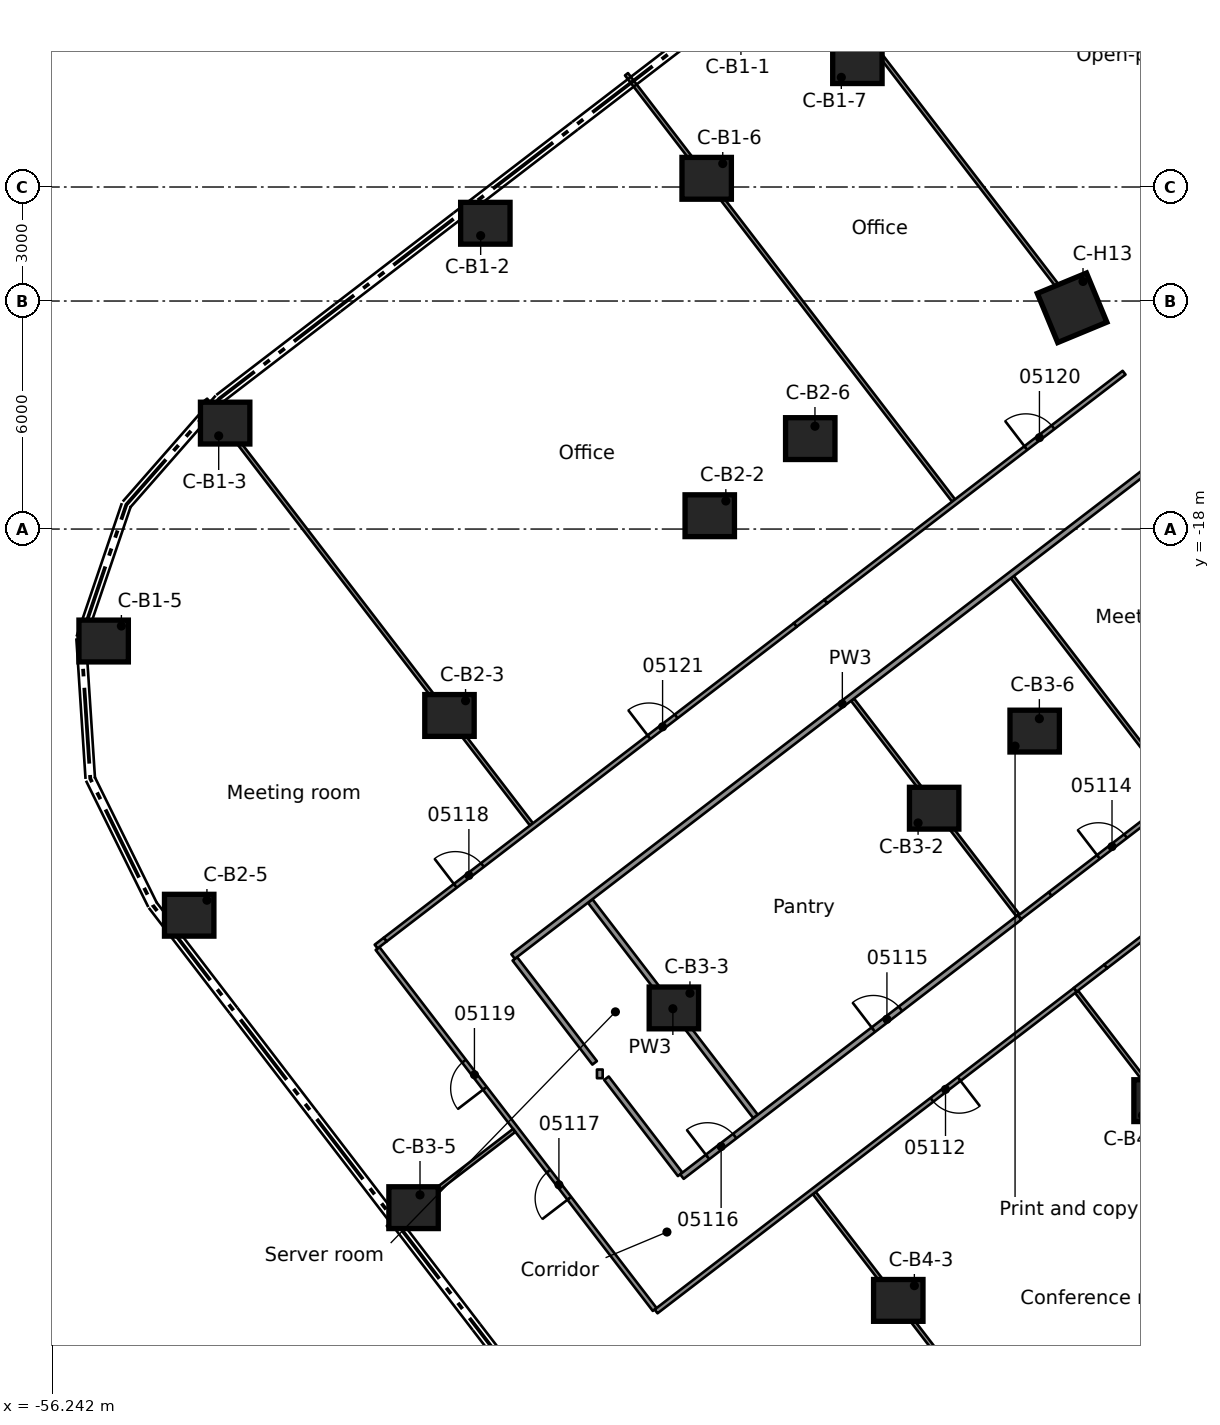
"""IFC4 building model, lengths in metres.
Left out: names, types, materials, properties, quantities, classifications, styles, units other than length and angle.
Written with IfcOpenShell. Run it as: python <this file> out.ifc"""

import sys

from ifc_helpers import new_model, si_unit, direction, frame, frame_2d, origin, origin_2d, place, context, subcontext, project, spatial, rectangle, extrude, element, fill, save


model = new_model("IFC4")
c1 = context("Model", 3, precision=1e-05, world=origin(), true_north=direction((0.0, 1.0)))
c2 = subcontext(c1, "Body", "Model", "MODEL_VIEW")
j1 = project(units=[si_unit("LENGTHUNIT", "METRE"), si_unit("PLANEANGLEUNIT", "RADIAN")], contexts=[c1])
p1 = place(None, origin())
s1 = spatial("IfcSite", under=j1, at=p1, CompositionType="ELEMENT")
p2 = place(p1, origin())
s2 = spatial("IfcBuilding", under=s1, at=p2, CompositionType="ELEMENT")
p3 = place(p2, frame((0.0, 0.0, 25.1)))
s3 = spatial("IfcBuildingStorey", under=s2, at=p3, CompositionType="ELEMENT", Elevation=25.1)
for number, where, z_axis, x_axis in (
    (1, (-44.84, -9.954, 0.0), (0.0, 0.0, 1.0), (1.0, 0.0, 0.0)),
    (2, (-51.687, -15.212, 0.0), (0.0, 0.0, 1.0), (1.0, 0.0, 0.0)),
    (3, (-54.884, -20.946, 0.0), (0.0, 0.0, 1.0), (1.0, 0.0, 0.0)),
    (4, (-39.016, -8.771, 0.0), (0.0, 0.0, 1.0), (1.0, 0.0, 0.0)),
    (5, (-35.05, -5.727, 0.0), (0.0, 0.0, 1.0), (1.0, 0.0, 0.0)),
    (6, (-38.935, -17.649, 0.0), (0.0, 0.0, 1.0), (1.0, 0.0, 0.0)),
    (7, (-45.784, -22.905, 0.0), (0.0, 0.0, 1.0), (1.0, 0.0, 0.0)),
    (8, (-52.633, -28.161, 0.0), (0.0, 0.0, 1.0), (1.0, 0.0, 0.0)),
    (9, (-36.29, -15.62, 0.0), (0.0, 0.0, 1.0), (1.0, 0.0, 0.0)),
    (10, (-33.03, -25.345, 0.0), (0.0, 0.0, 1.0), (1.0, 0.0, 0.0)),
    (11, (-39.879, -30.6, 0.0), (0.0, 0.0, 1.0), (1.0, 0.0, 0.0)),
    (12, (-46.729, -35.856, 0.0), (0.0, 0.0, 1.0), (1.0, 0.0, 0.0)),
    (13, (-30.385, -23.316, 0.0), (0.0, 0.0, 1.0), (1.0, 0.0, 0.0)),
    (14, (-27.125, -33.04, 0.0), (0.0, 0.0, 1.0), (1.0, 0.0, 0.0)),
    (15, (-33.974, -38.296, 0.0), (0.0, 0.0, 1.0), (1.0, 0.0, 0.0)),
):
    element("IfcColumn", number, at=place(p3, frame(where, z_axis=z_axis, x_axis=x_axis)), inside=s3, PredefinedType="COLUMN", context=c2, shape_type="SweptSolid", body=[
        extrude(rectangle(XDim=1.3, YDim=1.1, at=origin_2d()), origin(), (0.0, 0.0, 1.0), 4.1),
    ])
p4 = place(p3, frame((-29.4, -12.178, 0.0), z_axis=(0.0, 0.0, 1.0), x_axis=(-0.923879532511, -0.382683432365, 0.0)))
e16 = element("IfcColumn", 16, at=p4, inside=s3, PredefinedType="COLUMN", context=c2, shape_type="SweptSolid", body=[
    extrude(rectangle(XDim=1.4, YDim=1.4, at=origin_2d()), origin(), (0.0, 0.0, 1.0), 4.1),
])
p5 = place(p3, frame((-40.384, -38.535, 0.0), z_axis=(0.0, 0.0, 1.0), x_axis=(-0.609026744184, 0.793149686294, 0.0)))
e17 = element("IfcWall", 17, at=p5, inside=s3, PredefinedType="PARTITIONING", context=c2, shape_type="SweptSolid", body=[
    extrude(rectangle(XDim=11.975, YDim=0.125, at=frame_2d((5.987, 0.0))), origin(), (0.0, 0.0, 1.0), 3.68),
])
p6 = place(p5, frame((3.688, 0.0, 0.0)))
e18 = element("IfcOpeningElement", 18, at=p6, cuts=e17, PredefinedType="OPENING", context=c2, shape_type="SweptSolid", body=[
    extrude(rectangle(XDim=0.9, YDim=2.1, at=frame_2d((0.45, 1.05))), frame((0.0, 0.073, 0.0), z_axis=(0.0, -1.0, 0.0), x_axis=(1.0, 0.0, 0.0)), (0.0, 0.0, 1.0), 0.145),
])
p7 = place(p5, frame((7.338, 0.0, 0.0)))
e19 = element("IfcOpeningElement", 19, at=p7, cuts=e17, PredefinedType="OPENING", context=c2, shape_type="SweptSolid", body=[
    extrude(rectangle(XDim=0.9, YDim=2.1, at=frame_2d((0.45, 1.05))), frame((0.0, 0.073, 0.0), z_axis=(0.0, -1.0, 0.0), x_axis=(1.0, 0.0, 0.0)), (0.0, 0.0, 1.0), 0.145),
])
p8 = place(p3, frame((-44.064, -29.307, 0.0), z_axis=(0.0, 0.0, 1.0), x_axis=(0.608421148176, -0.793614331053, 0.0)))
e20 = element("IfcWall", 20, at=p8, inside=s3, PredefinedType="PARTITIONING", context=c2, shape_type="SweptSolid", body=[
    extrude(rectangle(XDim=3.451, YDim=0.15, at=frame_2d((1.726, 0.0))), origin(), (0.0, 0.0, 1.0), 3.68),
])
p9 = place(p3, frame((-41.653, -32.45, 0.0), z_axis=(0.0, 0.0, 1.0), x_axis=(0.60867753108, -0.793417710389, 0.0)))
e21 = element("IfcWall", 21, at=p9, inside=s3, PredefinedType="PARTITIONING", context=c2, shape_type="SweptSolid", body=[
    extrude(rectangle(XDim=3.188, YDim=0.15, at=frame_2d((1.594, 0.0))), origin(), (0.0, 0.0, 1.0), 3.68),
])
p10 = place(p3, frame((-52.2, -14.599, 0.0), z_axis=(0.0, 0.0, 1.0), x_axis=(0.608818023879, -0.793309910312, 0.0)))
e22 = element("IfcWall", 22, at=p10, inside=s3, PredefinedType="PARTITIONING", context=c2, shape_type="SweptSolid", body=[
    extrude(rectangle(XDim=14.081, YDim=0.1, at=frame_2d((7.041, 0.0))), origin(), (0.0, 0.0, 1.0), 3.68),
])
p11 = place(p3, frame((-42.081, -27.786, 0.0), z_axis=(0.0, 0.0, 1.0), x_axis=(0.608779288924, -0.793339635577, 0.0)))
e23 = element("IfcWall", 23, at=p11, inside=s3, PredefinedType="PARTITIONING", context=c2, shape_type="SweptSolid", body=[
    extrude(rectangle(XDim=7.147, YDim=0.15, at=frame_2d((3.574, 0.0))), origin(), (0.0, 0.0, 1.0), 3.68),
])
p12 = place(p3, frame((-36.184, -35.471, 0.0), z_axis=(0.0, 0.0, 1.0), x_axis=(0.608732507749, -0.793375531517, 0.0)))
e24 = element("IfcWall", 24, at=p12, inside=s3, PredefinedType="PARTITIONING", context=c2, shape_type="SweptSolid", body=[
    extrude(rectangle(XDim=14.082, YDim=0.1, at=frame_2d((7.041, 0.0))), origin(), (0.0, 0.0, 1.0), 3.68),
])
p13 = place(p3, frame((-35.179, -22.489, 0.0), z_axis=(0.0, 0.0, 1.0), x_axis=(0.608729798771, -0.793377610024, 0.0)))
e25 = element("IfcWall", 25, at=p13, inside=s3, PredefinedType="PARTITIONING", context=c2, shape_type="SweptSolid", body=[
    extrude(rectangle(XDim=7.148, YDim=0.1, at=frame_2d((3.574, 0.0))), origin(), (0.0, 0.0, 1.0), 3.68),
])
p14 = place(p3, frame((-29.282, -30.176, 0.0), z_axis=(0.0, 0.0, 1.0), x_axis=(0.608773787241, -0.793343857333, 0.0)))
e26 = element("IfcWall", 26, at=p14, inside=s3, PredefinedType="PARTITIONING", context=c2, shape_type="SweptSolid", body=[
    extrude(rectangle(XDim=14.135, YDim=0.1, at=frame_2d((7.067, 0.0))), origin(), (0.0, 0.0, 1.0), 3.68),
])
p15 = place(p3, frame((-41.126, -6.033, 0.0), z_axis=(0.0, 0.0, 1.0), x_axis=(0.608775561638, -0.793342495743, 0.0)))
e27 = element("IfcWall", 27, at=p15, inside=s3, PredefinedType="PARTITIONING", context=c2, shape_type="SweptSolid", body=[
    extrude(rectangle(XDim=14.136, YDim=0.1, at=frame_2d((7.068, 0.0))), origin(), (0.0, 0.0, 1.0), 3.68),
])
p16 = place(p3, frame((-30.975, -19.261, 0.0), z_axis=(0.0, 0.0, 1.0), x_axis=(0.60876639971, -0.793349526113, 0.0)))
e28 = element("IfcWall", 28, at=p16, inside=s3, PredefinedType="PARTITIONING", context=c2, shape_type="SweptSolid", body=[
    extrude(rectangle(XDim=7.162, YDim=0.1, at=frame_2d((3.581, 0.0))), origin(), (0.0, 0.0, 1.0), 3.68),
])
p17 = place(p3, frame((-36.678, -2.62, 0.0), z_axis=(0.0, 0.0, 1.0), x_axis=(0.608767789656, -0.793348459555, 0.0)))
e29 = element("IfcWall", 29, at=p17, inside=s3, PredefinedType="PARTITIONING", context=c2, shape_type="SweptSolid", body=[
    extrude(rectangle(XDim=11.842, YDim=0.1, at=frame_2d((5.921, 0.0))), origin(), (0.0, 0.0, 1.0), 3.68),
])
p18 = place(p3, frame((-29.32, -30.124, 0.0), z_axis=(0.0, 0.0, 1.0), x_axis=(0.793776779764, 0.608209194198, 0.0)))
e30 = element("IfcWall", 30, at=p18, inside=s3, PredefinedType="PARTITIONING", context=c2, shape_type="SweptSolid", body=[
    extrude(rectangle(XDim=1.014, YDim=0.125, at=frame_2d((0.507, 0.0))), origin(), (0.0, 0.0, 1.0), 3.68),
])
p19 = place(p3, frame((-29.32, -30.127, 0.0), z_axis=(0.0, 0.0, 1.0), x_axis=(-0.793456491448, -0.608626976217, 0.0)))
e31 = element("IfcWall", 31, at=p19, inside=s3, PredefinedType="PARTITIONING", context=c2, shape_type="SweptSolid", body=[
    extrude(rectangle(XDim=13.898, YDim=0.125, at=frame_2d((6.949, 0.0))), origin(), (0.0, 0.0, 1.0), 3.68),
])
p20 = place(p19, frame((3.849, 0.0, 0.0)))
e32 = element("IfcOpeningElement", 32, at=p20, cuts=e31, PredefinedType="OPENING", context=c2, shape_type="SweptSolid", body=[
    extrude(rectangle(XDim=0.9, YDim=2.1, at=frame_2d((0.45, 1.05))), frame((0.0, 0.073, 0.0), z_axis=(0.0, -1.0, 0.0), x_axis=(1.0, 0.0, 0.0)), (0.0, 0.0, 1.0), 0.145),
])
p21 = place(p3, frame((-20.669, -23.487, 0.0), z_axis=(0.0, 0.0, 1.0), x_axis=(-0.793372266626, -0.608736762935, 0.0)))
e33 = element("IfcWall", 33, at=p21, inside=s3, PredefinedType="PARTITIONING", context=c2, shape_type="SweptSolid", body=[
    extrude(rectangle(XDim=9.889, YDim=0.125, at=frame_2d((4.945, 0.0))), origin(), (0.0, 0.0, 1.0), 3.68),
])
p22 = place(p21, frame((1.849, 0.0, 0.0)))
e34 = element("IfcOpeningElement", 34, at=p22, cuts=e33, PredefinedType="OPENING", context=c2, shape_type="SweptSolid", body=[
    extrude(rectangle(XDim=1.8, YDim=2.1, at=frame_2d((0.9, 1.05))), frame((0.0, 0.073, 0.0), z_axis=(0.0, -1.0, 0.0), x_axis=(1.0, 0.0, 0.0)), (0.0, 0.0, 1.0), 0.145),
])
p23 = place(p3, frame((-30.782, -28.22, 0.0), z_axis=(0.0, 0.0, 1.0), x_axis=(0.793579274907, 0.608466872096, 0.0)))
e35 = element("IfcWall", 35, at=p23, inside=s3, PredefinedType="PARTITIONING", context=c2, shape_type="SweptSolid", body=[
    extrude(rectangle(XDim=1.016, YDim=0.125, at=frame_2d((0.508, 0.0))), origin(), (0.0, 0.0, 1.0), 3.68),
])
p24 = place(p3, frame((-39.667, -35.038, 0.0), z_axis=(0.0, 0.0, 1.0), x_axis=(0.793293656215, 0.608839202917, 0.0)))
e36 = element("IfcWall", 36, at=p24, inside=s3, PredefinedType="PARTITIONING", context=c2, shape_type="SweptSolid", body=[
    extrude(rectangle(XDim=11.2, YDim=0.15, at=frame_2d((5.6, 0.0))), origin(), (0.0, 0.0, 1.0), 3.68),
])
p25 = place(p24, frame((6.35, 0.0, 0.0)))
e37 = element("IfcOpeningElement", 37, at=p25, cuts=e36, PredefinedType="OPENING", context=c2, shape_type="SweptSolid", body=[
    extrude(rectangle(XDim=0.9, YDim=2.1, at=frame_2d((0.45, 1.05))), frame((0.0, 0.085, 0.0), z_axis=(0.0, -1.0, 0.0), x_axis=(1.0, 0.0, 0.0)), (0.0, 0.0, 1.0), 0.17),
])
p26 = place(p24, frame((0.85, 0.0, 0.0)))
e38 = element("IfcOpeningElement", 38, at=p26, cuts=e36, PredefinedType="OPENING", context=c2, shape_type="SweptSolid", body=[
    extrude(rectangle(XDim=0.9, YDim=2.1, at=frame_2d((0.45, 1.05))), frame((0.0, 0.085, 0.0), z_axis=(0.0, -1.0, 0.0), x_axis=(1.0, 0.0, 0.0)), (0.0, 0.0, 1.0), 0.17),
])
p27 = place(p3, frame((-29.976, -27.602, 0.0), z_axis=(0.0, 0.0, 1.0), x_axis=(0.793237948633, 0.608911780843, 0.0)))
e39 = element("IfcWall", 39, at=p27, inside=s3, PredefinedType="PARTITIONING", context=c2, shape_type="SweptSolid", body=[
    extrude(rectangle(XDim=9.336, YDim=0.125, at=frame_2d((4.668, 0.0))), origin(), (0.0, 0.0, 1.0), 3.68),
])
p28 = place(p27, frame((6.385, 0.0, 0.0)))
e40 = element("IfcOpeningElement", 40, at=p28, cuts=e39, PredefinedType="OPENING", context=c2, shape_type="SweptSolid", body=[
    extrude(rectangle(XDim=0.9, YDim=2.1, at=frame_2d((0.45, 1.05))), frame((0.0, 0.073, 0.0), z_axis=(0.0, -1.0, 0.0), x_axis=(1.0, 0.0, 0.0)), (0.0, 0.0, 1.0), 0.145),
])
p29 = place(p27, frame((1.6, 0.0, 0.0)))
e41 = element("IfcOpeningElement", 41, at=p29, cuts=e39, PredefinedType="OPENING", context=c2, shape_type="SweptSolid", body=[
    extrude(rectangle(XDim=0.9, YDim=2.1, at=frame_2d((0.45, 1.05))), frame((0.0, 0.073, 0.0), z_axis=(0.0, -1.0, 0.0), x_axis=(1.0, 0.0, 0.0)), (0.0, 0.0, 1.0), 0.145),
])
p30 = place(p3, frame((-47.403, -36.374, 0.0), z_axis=(0.0, 0.0, 1.0), x_axis=(0.793154740431, 0.609020162008, 0.0)))
e42 = element("IfcWall", 42, at=p30, inside=s3, PredefinedType="PARTITIONING", context=c2, shape_type="SweptSolid", body=[
    extrude(rectangle(XDim=4.187, YDim=0.1, at=frame_2d((2.094, 0.0))), origin(), (0.0, 0.0, 1.0), 3.68),
])
p31 = place(p3, frame((-44.11, -29.247, 0.0), z_axis=(0.0, 0.0, 1.0), x_axis=(0.793471030698, 0.608608021179, 0.0)))
e43 = element("IfcWall", 43, at=p31, inside=s3, PredefinedType="PARTITIONING", context=c2, shape_type="SweptSolid", body=[
    extrude(rectangle(XDim=21.838, YDim=0.15, at=frame_2d((10.919, 0.0))), origin(), (0.0, 0.0, 1.0), 3.68),
])
p32 = place(p3, frame((-36.687, -20.524, 0.0), z_axis=(0.0, 0.0, 1.0), x_axis=(0.793579274907, 0.608466872096, 0.0)))
e44 = element("IfcWall", 44, at=p32, inside=s3, PredefinedType="PARTITIONING", context=c2, shape_type="SweptSolid", body=[
    extrude(rectangle(XDim=1.016, YDim=0.125, at=frame_2d((0.508, 0.0))), origin(), (0.0, 0.0, 1.0), 3.68),
])
p33 = place(p3, frame((-47.476, -28.803, 0.0), z_axis=(0.0, 0.0, 1.0), x_axis=(0.793430085013, 0.608661400284, 0.0)))
e45 = element("IfcWall", 45, at=p33, inside=s3, PredefinedType="PARTITIONING", context=c2, shape_type="SweptSolid", body=[
    extrude(rectangle(XDim=13.6, YDim=0.125, at=frame_2d((6.8, 0.0))), origin(), (0.0, 0.0, 1.0), 3.68),
])
p34 = place(p33, frame((2.326, 0.0, 0.0)))
e46 = element("IfcOpeningElement", 46, at=p34, cuts=e45, PredefinedType="OPENING", context=c2, shape_type="SweptSolid", body=[
    extrude(rectangle(XDim=0.9, YDim=2.1, at=frame_2d((0.45, 1.05))), frame((0.0, 0.073, 0.0), z_axis=(0.0, -1.0, 0.0), x_axis=(1.0, 0.0, 0.0)), (0.0, 0.0, 1.0), 0.145),
])
p35 = place(p33, frame((8.75, 0.0, 0.0)))
e47 = element("IfcOpeningElement", 47, at=p35, cuts=e45, PredefinedType="OPENING", context=c2, shape_type="SweptSolid", body=[
    extrude(rectangle(XDim=0.9, YDim=2.1, at=frame_2d((0.45, 1.05))), frame((0.0, 0.073, 0.0), z_axis=(0.0, -1.0, 0.0), x_axis=(1.0, 0.0, 0.0)), (0.0, 0.0, 1.0), 0.145),
])
p36 = place(p3, frame((-35.881, -19.906, 0.0), z_axis=(0.0, 0.0, 1.0), x_axis=(0.793491146474, 0.608581794394, 0.0)))
e48 = element("IfcWall", 48, at=p36, inside=s3, PredefinedType="PARTITIONING", context=c2, shape_type="SweptSolid", body=[
    extrude(rectangle(XDim=9.892, YDim=0.125, at=frame_2d((4.946, 0.0))), origin(), (0.0, 0.0, 1.0), 3.68),
])
p37 = place(p36, frame((6.634, 0.0, 0.0)))
e49 = element("IfcOpeningElement", 49, at=p37, cuts=e48, PredefinedType="OPENING", context=c2, shape_type="SweptSolid", body=[
    extrude(rectangle(XDim=0.9, YDim=2.1, at=frame_2d((0.45, 1.05))), frame((0.0, 0.073, 0.0), z_axis=(0.0, -1.0, 0.0), x_axis=(1.0, 0.0, 0.0)), (0.0, 0.0, 1.0), 0.145),
])
p38 = place(p3, frame((-47.714, -28.986, 0.0), z_axis=(0.0, 0.0, 1.0), x_axis=(0.792623989105, 0.60971076085, 0.0)))
e50 = element("IfcWall", 50, at=p38, inside=s3, PredefinedType="PARTITIONING", context=c2, shape_type="SweptSolid", body=[
    extrude(rectangle(XDim=0.3, YDim=0.125, at=frame_2d((0.15, 0.0))), origin(), (0.0, 0.0, 1.0), 3.68),
])
p39 = place(p3, frame((-41.828, -32.449, 0.0), z_axis=(0.0, 0.0, 1.0), x_axis=(0.0, 1.0, 0.0)))
e51 = element("IfcWall", 51, at=p39, inside=s3, PredefinedType="PARTITIONING", context=c2, shape_type="SweptSolid", body=[
    extrude(rectangle(XDim=0.228, YDim=0.15, at=frame_2d((0.114, 0.0))), origin(), (0.0, 0.0, 1.0), 3.68),
])
p40 = place(p20, origin())
e52 = element("IfcDoor", 52, at=p40, inside=s3, OperationType="SINGLE_SWING_LEFT", PredefinedType="DOOR", context=c2, shape_type="SweptSolid", body=[
    extrude(rectangle(XDim=0.9, YDim=2.1, at=frame_2d((0.45, 1.05))), frame((0.0, 0.025, 0.0), z_axis=(0.0, -1.0, 0.0), x_axis=(1.0, 0.0, 0.0)), (0.0, 0.0, 1.0), 0.05),
])
fill(e32, e52)
p41 = place(p29, origin())
e53 = element("IfcDoor", 53, at=p41, inside=s3, OperationType="SINGLE_SWING_LEFT", PredefinedType="DOOR", context=c2, shape_type="SweptSolid", body=[
    extrude(rectangle(XDim=0.9, YDim=2.1, at=frame_2d((0.45, 1.05))), frame((0.0, 0.025, 0.0), z_axis=(0.0, -1.0, 0.0), x_axis=(1.0, 0.0, 0.0)), (0.0, 0.0, 1.0), 0.05),
])
fill(e41, e53)
p42 = place(p25, origin())
e54 = element("IfcDoor", 54, at=p42, inside=s3, OperationType="SINGLE_SWING_RIGHT", PredefinedType="DOOR", context=c2, shape_type="SweptSolid", body=[
    extrude(rectangle(XDim=0.9, YDim=2.1, at=frame_2d((0.45, 1.05))), frame((0.0, 0.025, 0.0), z_axis=(0.0, -1.0, 0.0), x_axis=(1.0, 0.0, 0.0)), (0.0, 0.0, 1.0), 0.05),
])
fill(e37, e54)
p43 = place(p26, origin())
e55 = element("IfcDoor", 55, at=p43, inside=s3, OperationType="SINGLE_SWING_LEFT", PredefinedType="DOOR", context=c2, shape_type="SweptSolid", body=[
    extrude(rectangle(XDim=0.9, YDim=2.1, at=frame_2d((0.45, 1.05))), frame((0.0, 0.025, 0.0), z_axis=(0.0, -1.0, 0.0), x_axis=(1.0, 0.0, 0.0)), (0.0, 0.0, 1.0), 0.05),
])
fill(e38, e55)
p44 = place(p6, origin())
e56 = element("IfcDoor", 56, at=p44, inside=s3, OperationType="SINGLE_SWING_LEFT", PredefinedType="DOOR", context=c2, shape_type="SweptSolid", body=[
    extrude(rectangle(XDim=0.9, YDim=2.1, at=frame_2d((0.45, 1.05))), frame((0.0, 0.025, 0.0), z_axis=(0.0, -1.0, 0.0), x_axis=(1.0, 0.0, 0.0)), (0.0, 0.0, 1.0), 0.05),
])
fill(e18, e56)
p45 = place(p34, origin())
e57 = element("IfcDoor", 57, at=p45, inside=s3, OperationType="SINGLE_SWING_LEFT", PredefinedType="DOOR", context=c2, shape_type="SweptSolid", body=[
    extrude(rectangle(XDim=0.9, YDim=2.1, at=frame_2d((0.45, 1.05))), frame((0.0, 0.025, 0.0), z_axis=(0.0, -1.0, 0.0), x_axis=(1.0, 0.0, 0.0)), (0.0, 0.0, 1.0), 0.05),
])
fill(e46, e57)
p46 = place(p7, origin())
e58 = element("IfcDoor", 58, at=p46, inside=s3, OperationType="SINGLE_SWING_RIGHT", PredefinedType="DOOR", context=c2, shape_type="SweptSolid", body=[
    extrude(rectangle(XDim=0.9, YDim=2.1, at=frame_2d((0.45, 1.05))), frame((0.0, 0.025, 0.0), z_axis=(0.0, -1.0, 0.0), x_axis=(1.0, 0.0, 0.0)), (0.0, 0.0, 1.0), 0.05),
])
fill(e19, e58)
p47 = place(p37, origin())
e59 = element("IfcDoor", 59, at=p47, inside=s3, OperationType="SINGLE_SWING_RIGHT", PredefinedType="DOOR", context=c2, shape_type="SweptSolid", body=[
    extrude(rectangle(XDim=0.9, YDim=2.1, at=frame_2d((0.45, 1.05))), frame((0.0, 0.025, 0.0), z_axis=(0.0, -1.0, 0.0), x_axis=(1.0, 0.0, 0.0)), (0.0, 0.0, 1.0), 0.05),
])
fill(e49, e59)
p48 = place(p35, origin())
e60 = element("IfcDoor", 60, at=p48, inside=s3, OperationType="SINGLE_SWING_RIGHT", PredefinedType="DOOR", context=c2, shape_type="SweptSolid", body=[
    extrude(rectangle(XDim=0.9, YDim=2.1, at=frame_2d((0.45, 1.05))), frame((0.0, 0.025, 0.0), z_axis=(0.0, -1.0, 0.0), x_axis=(1.0, 0.0, 0.0)), (0.0, 0.0, 1.0), 0.05),
])
fill(e47, e60)
save(model, sys.argv[1])
